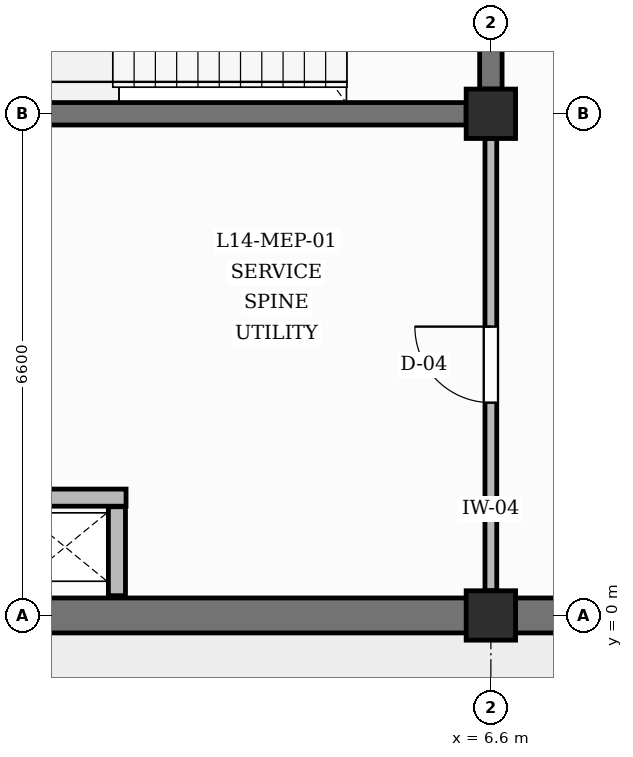
"""IFC4 building model, lengths in metres.
Left out: names, types, materials, properties, quantities, classifications, styles, units other than length and angle.
Written with IfcOpenShell. Run it as: python <this file> out.ifc"""

import sys

from ifc_helpers import new_model, si_unit, direction, frame, frame_2d, origin, origin_2d, place, context, subcontext, project, spatial, rectangle, extrude, element, fill, save


model = new_model("IFC4")
c1 = context("Model", 3, precision=1e-05, world=origin(), true_north=direction((0.0, 1.0)))
c2 = subcontext(c1, "Body", "Model", "MODEL_VIEW")
j1 = project(units=[si_unit("LENGTHUNIT", "METRE"), si_unit("PLANEANGLEUNIT", "RADIAN")], contexts=[c1])
p1 = place(None, origin())
s1 = spatial("IfcSite", under=j1, at=p1, CompositionType="ELEMENT")
p2 = place(p1, origin())
s2 = spatial("IfcBuilding", under=s1, at=p2, CompositionType="ELEMENT")
p3 = place(p2, frame((0.0, 0.0, 60.6)))
s3 = spatial("IfcBuildingStorey", under=s2, at=p3, CompositionType="ELEMENT", Elevation=60.6)
for number, where, z_axis, x_axis in (
    (1, (6.6, 0.0, 0.0), (0.0, 0.0, 1.0), (1.0, 0.0, 0.0)),
    (2, (6.6, 6.6, 0.0), (0.0, 0.0, 1.0), (1.0, 0.0, 0.0)),
):
    element("IfcColumn", number, at=place(p3, frame(where, z_axis=z_axis, x_axis=x_axis)), inside=s3, PredefinedType="COLUMN", context=c2, shape_type="SweptSolid", body=[
        extrude(rectangle(XDim=0.65, YDim=0.65, at=origin_2d()), origin(), (0.0, 0.0, 1.0), 4.2),
    ])
for number, where, z_axis, x_axis in (
    (3, (0.325, 0.0, 0.0), (0.0, 0.0, 1.0), (1.0, 0.0, 0.0)),
    (4, (6.925, 0.0, 0.0), (0.0, 0.0, 1.0), (1.0, 0.0, 0.0)),
):
    element("IfcWall", number, at=place(p3, frame(where, z_axis=z_axis, x_axis=x_axis)), inside=s3, PredefinedType="SOLIDWALL", context=c2, shape_type="SweptSolid", body=[
        extrude(rectangle(XDim=5.95, YDim=0.46, at=frame_2d((2.975, 0.0))), origin(), (0.0, 0.0, 1.0), 3.31),
    ])
p4 = place(p3, frame((0.325, 6.6, 0.0), z_axis=(0.0, 0.0, 1.0), x_axis=(1.0, 0.0, 0.0)))
e5 = element("IfcWall", 5, at=p4, inside=s3, PredefinedType="SHEAR", context=c2, shape_type="SweptSolid", body=[
    extrude(rectangle(XDim=5.95, YDim=0.295, at=frame_2d((2.975, 0.0))), origin(), (0.0, 0.0, 1.0), 3.31),
])
p5 = place(p3, frame((6.6, 6.925, 0.0), z_axis=(0.0, 0.0, 1.0), x_axis=(0.0, 1.0, 0.0)))
e6 = element("IfcWall", 6, at=p5, inside=s3, PredefinedType="SHEAR", context=c2, shape_type="SweptSolid", body=[
    extrude(rectangle(XDim=5.95, YDim=0.295, at=frame_2d((2.975, 0.0))), origin(), (0.0, 0.0, 1.0), 3.31),
])
p6 = place(p5, frame((2.4, 0.0, 0.0)))
e7 = element("IfcOpeningElement", 7, at=p6, cuts=e6, PredefinedType="OPENING", context=c2, shape_type="SweptSolid", body=[
    extrude(rectangle(XDim=1.15, YDim=2.2, at=frame_2d((0.575, 1.1))), frame((0.0, 0.157, 0.0), z_axis=(0.0, -1.0, 0.0), x_axis=(1.0, 0.0, 0.0)), (0.0, 0.0, 1.0), 0.315),
])
p7 = place(p3, frame((1.68, 0.26, 0.0), z_axis=(0.0, 0.0, 1.0), x_axis=(0.0, 1.0, 0.0)))
e8 = element("IfcWall", 8, at=p7, inside=s3, PredefinedType="PARTITIONING", context=c2, shape_type="SweptSolid", body=[
    extrude(rectangle(XDim=1.17, YDim=0.225, at=frame_2d((0.585, 0.0))), origin(), (0.0, 0.0, 1.0), 3.91),
])
p8 = place(p3, frame((0.26, 1.55, 0.0), z_axis=(0.0, 0.0, 1.0), x_axis=(1.0, 0.0, 0.0)))
e9 = element("IfcWall", 9, at=p8, inside=s3, PredefinedType="PARTITIONING", context=c2, shape_type="SweptSolid", body=[
    extrude(rectangle(XDim=1.54, YDim=0.225, at=frame_2d((0.77, 0.0))), origin(), (0.0, 0.0, 1.0), 3.91),
])
p9 = place(p3, frame((6.6, 0.325, 0.0), z_axis=(0.0, 0.0, 1.0), x_axis=(0.0, 1.0, 0.0)))
e10 = element("IfcWall", 10, at=p9, inside=s3, PredefinedType="PARTITIONING", context=c2, shape_type="SweptSolid", body=[
    extrude(rectangle(XDim=5.95, YDim=0.155, at=frame_2d((2.975, 0.0))), origin(), (0.0, 0.0, 1.0), 3.31),
])
p10 = place(p9, frame((2.475, 0.0, 0.0)))
e11 = element("IfcOpeningElement", 11, at=p10, cuts=e10, PredefinedType="OPENING", context=c2, shape_type="SweptSolid", body=[
    extrude(rectangle(XDim=1.0, YDim=2.1, at=frame_2d((0.5, 1.05))), frame((0.0, 0.087, 0.0), z_axis=(0.0, -1.0, 0.0), x_axis=(1.0, 0.0, 0.0)), (0.0, 0.0, 1.0), 0.175),
])
p11 = place(p10, origin())
e12 = element("IfcDoor", 12, at=p11, inside=s3, OperationType="SINGLE_SWING_RIGHT", PredefinedType="DOOR", context=c2, shape_type="SweptSolid", body=[
    extrude(rectangle(XDim=1.0, YDim=2.1, at=frame_2d((0.5, 1.05))), frame((0.0, 0.025, 0.0), z_axis=(0.0, -1.0, 0.0), x_axis=(1.0, 0.0, 0.0)), (0.0, 0.0, 1.0), 0.05),
])
fill(e11, e12)
save(model, sys.argv[1])
